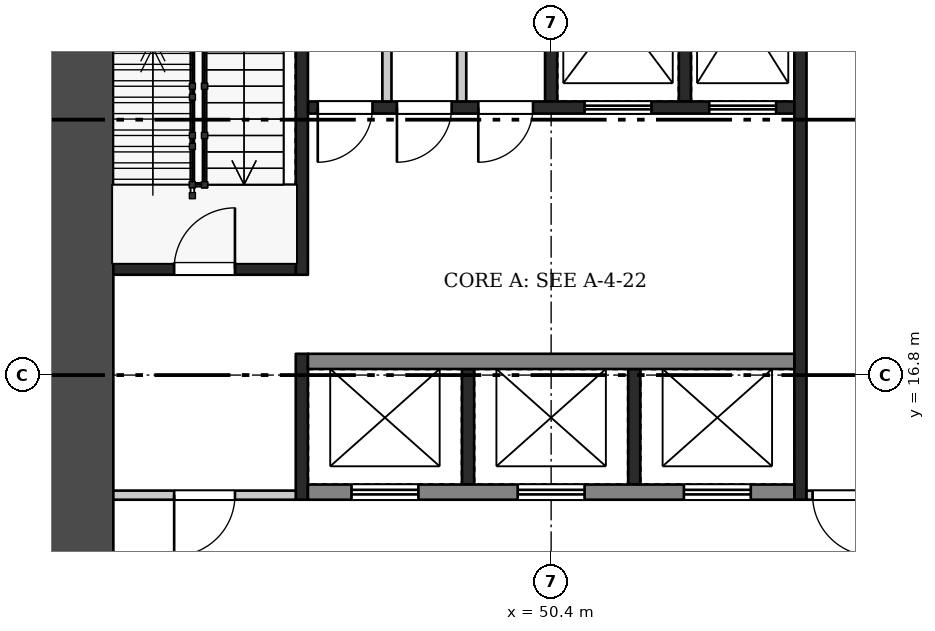
"""IFC4 building model, lengths in metres.
Left out: names, types, materials, properties, quantities, classifications, styles, units other than length and angle.
Written with IfcOpenShell. Run it as: python <this file> out.ifc"""

import sys

from ifc_helpers import new_model, si_unit, direction, frame, frame_2d, origin, place, context, subcontext, project, spatial, rectangle, extrude, element, fill, save


model = new_model("IFC4")
c1 = context("Model", 3, precision=1e-05, world=origin(), true_north=direction((0.0, 1.0)))
c2 = subcontext(c1, "Body", "Model", "MODEL_VIEW")
j1 = project(units=[si_unit("LENGTHUNIT", "METRE"), si_unit("PLANEANGLEUNIT", "RADIAN")], contexts=[c1])
p1 = place(None, origin())
s1 = spatial("IfcSite", under=j1, at=p1, CompositionType="ELEMENT")
p2 = place(p1, origin())
s2 = spatial("IfcBuilding", under=s1, at=p2, CompositionType="ELEMENT")
p3 = place(p2, frame((0.0, 0.0, 140.7)))
s3 = spatial("IfcBuildingStorey", under=s2, at=p3, CompositionType="ELEMENT", Elevation=140.7)
p4 = place(p3, frame((42.6, 9.6, 0.0), z_axis=(0.0, 0.0, 1.0), x_axis=(0.0, 1.0, 0.0)))
e1 = element("IfcWall", 1, at=p4, inside=s3, PredefinedType="SHEAR", context=c2, shape_type="SweptSolid", body=[
    extrude(rectangle(XDim=14.4, YDim=1.2, at=frame_2d((7.2, 0.0))), origin(), (0.0, 0.0, 1.0), 6.72),
])
p5 = place(p4, frame((2.1, 0.0, 0.0)))
e2 = element("IfcOpeningElement", 2, at=p5, cuts=e1, PredefinedType="OPENING", context=c2, shape_type="SweptSolid", body=[
    extrude(rectangle(XDim=1.8, YDim=2.1, at=frame_2d((0.9, 1.05))), frame((0.0, 0.61, 0.0), z_axis=(0.0, -1.0, 0.0), x_axis=(1.0, 0.0, 0.0)), (0.0, 0.0, 1.0), 1.22),
])
for number, where, z_axis, x_axis in (
    (3, (49.033, 15.0, 0.0), (0.0, 0.0, 1.0), (0.0, 1.0, 0.0)),
    (4, (51.767, 15.0, 0.0), (0.0, 0.0, 1.0), (0.0, 1.0, 0.0)),
):
    element("IfcWall", number, at=place(p3, frame(where, z_axis=z_axis, x_axis=x_axis)), inside=s3, PredefinedType="SHEAR", context=c2, shape_type="SweptSolid", body=[
        extrude(rectangle(XDim=1.9, YDim=0.2, at=frame_2d((0.95, 0.0))), origin(), (0.0, 0.0, 1.0), 6.72),
    ])
p6 = place(p3, frame((46.4, 14.875, 0.0), z_axis=(0.0, 0.0, 1.0), x_axis=(1.0, 0.0, 0.0)))
e5 = element("IfcWall", 5, at=p6, inside=s3, PredefinedType="SHEAR", context=c2, shape_type="SweptSolid", body=[
    extrude(rectangle(XDim=8.0, YDim=0.25, at=frame_2d((4.0, 0.0))), origin(), (0.0, 0.0, 1.0), 6.72),
])
p7 = place(p6, frame((0.717, 0.0, 0.0)))
e6 = element("IfcOpeningElement", 6, at=p7, cuts=e5, PredefinedType="OPENING", context=c2, shape_type="SweptSolid", body=[
    extrude(rectangle(XDim=1.1, YDim=2.1, at=frame_2d((0.55, 1.05))), frame((0.0, 0.135, 0.0), z_axis=(0.0, -1.0, 0.0), x_axis=(1.0, 0.0, 0.0)), (0.0, 0.0, 1.0), 0.27),
])
p8 = place(p6, frame((3.45, 0.0, 0.0)))
e7 = element("IfcOpeningElement", 7, at=p8, cuts=e5, PredefinedType="OPENING", context=c2, shape_type="SweptSolid", body=[
    extrude(rectangle(XDim=1.1, YDim=2.1, at=frame_2d((0.55, 1.05))), frame((0.0, 0.135, 0.0), z_axis=(0.0, -1.0, 0.0), x_axis=(1.0, 0.0, 0.0)), (0.0, 0.0, 1.0), 0.27),
])
p9 = place(p6, frame((6.183, 0.0, 0.0)))
e8 = element("IfcOpeningElement", 8, at=p9, cuts=e5, PredefinedType="OPENING", context=c2, shape_type="SweptSolid", body=[
    extrude(rectangle(XDim=1.1, YDim=2.1, at=frame_2d((0.55, 1.05))), frame((0.0, 0.135, 0.0), z_axis=(0.0, -1.0, 0.0), x_axis=(1.0, 0.0, 0.0)), (0.0, 0.0, 1.0), 0.27),
])
p10 = place(p3, frame((46.4, 17.025, 0.0), z_axis=(0.0, 0.0, 1.0), x_axis=(1.0, 0.0, 0.0)))
e9 = element("IfcWall", 9, at=p10, inside=s3, PredefinedType="SHEAR", context=c2, shape_type="SweptSolid", body=[
    extrude(rectangle(XDim=8.0, YDim=0.25, at=frame_2d((4.0, 0.0))), origin(), (0.0, 0.0, 1.0), 6.72),
])
for number, where, z_axis, x_axis in (
    (10, (50.4, 21.3, 0.0), (0.0, 0.0, 1.0), (0.0, 1.0, 0.0)),
    (11, (52.6, 21.3, 0.0), (0.0, 0.0, 1.0), (0.0, 1.0, 0.0)),
):
    element("IfcWall", number, at=place(p3, frame(where, z_axis=z_axis, x_axis=x_axis)), inside=s3, PredefinedType="SHEAR", context=c2, shape_type="SweptSolid", body=[
        extrude(rectangle(XDim=2.7, YDim=0.2, at=frame_2d((1.35, 0.0))), origin(), (0.0, 0.0, 1.0), 6.72),
    ])
for number, where, z_axis, x_axis in (
    (12, (47.699, 21.3, 0.0), (0.0, 0.0, 1.0), (0.0, 1.0, 0.0)),
    (13, (48.929, 21.3, 0.0), (0.0, 0.0, 1.0), (0.0, 1.0, 0.0)),
):
    element("IfcWall", number, at=place(p3, frame(where, z_axis=z_axis, x_axis=x_axis)), inside=s3, PredefinedType="PARTITIONING", context=c2, shape_type="SweptSolid", body=[
        extrude(rectangle(XDim=2.7, YDim=0.15, at=frame_2d((1.35, 0.0))), origin(), (0.0, 0.0, 1.0), 6.72),
    ])
p11 = place(p3, frame((46.4, 21.2, 0.0), z_axis=(0.0, 0.0, 1.0), x_axis=(1.0, 0.0, 0.0)))
e14 = element("IfcWall", 14, at=p11, inside=s3, PredefinedType="SHEAR", context=c2, shape_type="SweptSolid", body=[
    extrude(rectangle(XDim=8.0, YDim=0.2, at=frame_2d((4.0, 0.0))), origin(), (0.0, 0.0, 1.0), 6.72),
])
p12 = place(p11, frame((0.162, 0.0, 0.0)))
e15 = element("IfcOpeningElement", 15, at=p12, cuts=e14, PredefinedType="OPENING", context=c2, shape_type="SweptSolid", body=[
    extrude(rectangle(XDim=0.9, YDim=2.1, at=frame_2d((0.45, 1.05))), frame((0.0, 0.11, 0.0), z_axis=(0.0, -1.0, 0.0), x_axis=(1.0, 0.0, 0.0)), (0.0, 0.0, 1.0), 0.22),
])
p13 = place(p11, frame((1.464, 0.0, 0.0)))
e16 = element("IfcOpeningElement", 16, at=p13, cuts=e14, PredefinedType="OPENING", context=c2, shape_type="SweptSolid", body=[
    extrude(rectangle(XDim=0.9, YDim=2.1, at=frame_2d((0.45, 1.05))), frame((0.0, 0.11, 0.0), z_axis=(0.0, -1.0, 0.0), x_axis=(1.0, 0.0, 0.0)), (0.0, 0.0, 1.0), 0.22),
])
p14 = place(p11, frame((2.802, 0.0, 0.0)))
e17 = element("IfcOpeningElement", 17, at=p14, cuts=e14, PredefinedType="OPENING", context=c2, shape_type="SweptSolid", body=[
    extrude(rectangle(XDim=0.9, YDim=2.1, at=frame_2d((0.45, 1.05))), frame((0.0, 0.11, 0.0), z_axis=(0.0, -1.0, 0.0), x_axis=(1.0, 0.0, 0.0)), (0.0, 0.0, 1.0), 0.22),
])
p15 = place(p11, frame((4.55, 0.0, 0.0)))
e18 = element("IfcOpeningElement", 18, at=p15, cuts=e14, PredefinedType="OPENING", context=c2, shape_type="SweptSolid", body=[
    extrude(rectangle(XDim=1.1, YDim=2.1, at=frame_2d((0.55, 1.05))), frame((0.0, 0.11, 0.0), z_axis=(0.0, -1.0, 0.0), x_axis=(1.0, 0.0, 0.0)), (0.0, 0.0, 1.0), 0.22),
])
p16 = place(p11, frame((6.6, 0.0, 0.0)))
e19 = element("IfcOpeningElement", 19, at=p16, cuts=e14, PredefinedType="OPENING", context=c2, shape_type="SweptSolid", body=[
    extrude(rectangle(XDim=1.1, YDim=2.1, at=frame_2d((0.55, 1.05))), frame((0.0, 0.11, 0.0), z_axis=(0.0, -1.0, 0.0), x_axis=(1.0, 0.0, 0.0)), (0.0, 0.0, 1.0), 0.22),
])
p17 = place(p3, frame((46.3, 14.75, 0.0), z_axis=(0.0, 0.0, 1.0), x_axis=(0.0, 1.0, 0.0)))
e20 = element("IfcWall", 20, at=p17, inside=s3, PredefinedType="SHEAR", context=c2, shape_type="SweptSolid", body=[
    extrude(rectangle(XDim=2.4, YDim=0.2, at=frame_2d((1.2, 0.0))), origin(), (0.0, 0.0, 1.0), 6.72),
])
p18 = place(p3, frame((46.3, 18.45, 0.0), z_axis=(0.0, 0.0, 1.0), x_axis=(0.0, 1.0, 0.0)))
e21 = element("IfcWall", 21, at=p18, inside=s3, PredefinedType="SHEAR", context=c2, shape_type="SweptSolid", body=[
    extrude(rectangle(XDim=5.55, YDim=0.2, at=frame_2d((2.775, 0.0))), origin(), (0.0, 0.0, 1.0), 6.72),
])
p19 = place(p3, frame((43.2, 14.825, 0.0), z_axis=(0.0, 0.0, 1.0), x_axis=(1.0, 0.0, 0.0)))
e22 = element("IfcWall", 22, at=p19, inside=s3, PredefinedType="PARTITIONING", context=c2, shape_type="SweptSolid", body=[
    extrude(rectangle(XDim=3.0, YDim=0.15, at=frame_2d((1.5, 0.0))), origin(), (0.0, 0.0, 1.0), 6.72),
])
p20 = place(p19, frame((1.0, 0.0, 0.0)))
e23 = element("IfcOpeningElement", 23, at=p20, cuts=e22, PredefinedType="OPENING", context=c2, shape_type="SweptSolid", body=[
    extrude(rectangle(XDim=1.0, YDim=2.1, at=frame_2d((0.5, 1.05))), frame((0.0, 0.085, 0.0), z_axis=(0.0, -1.0, 0.0), x_axis=(1.0, 0.0, 0.0)), (0.0, 0.0, 1.0), 0.17),
])
p21 = place(p3, frame((43.2, 18.55, 0.0), z_axis=(0.0, 0.0, 1.0), x_axis=(1.0, 0.0, 0.0)))
e24 = element("IfcWall", 24, at=p21, inside=s3, PredefinedType="SHEAR", context=c2, shape_type="SweptSolid", body=[
    extrude(rectangle(XDim=3.0, YDim=0.2, at=frame_2d((1.5, 0.0))), origin(), (0.0, 0.0, 1.0), 6.72),
])
p22 = place(p21, frame((1.0, 0.0, 0.0)))
e25 = element("IfcOpeningElement", 25, at=p22, cuts=e24, PredefinedType="OPENING", context=c2, shape_type="SweptSolid", body=[
    extrude(rectangle(XDim=1.0, YDim=2.1, at=frame_2d((0.5, 1.05))), frame((0.0, 0.11, 0.0), z_axis=(0.0, -1.0, 0.0), x_axis=(1.0, 0.0, 0.0)), (0.0, 0.0, 1.0), 0.22),
])
p23 = place(p3, frame((54.5, 14.75, 0.0), z_axis=(0.0, 0.0, 1.0), x_axis=(0.0, 1.0, 0.0)))
e26 = element("IfcWall", 26, at=p23, inside=s3, PredefinedType="SHEAR", context=c2, shape_type="SweptSolid", body=[
    extrude(rectangle(XDim=9.25, YDim=0.2, at=frame_2d((4.625, 0.0))), origin(), (0.0, 0.0, 1.0), 6.72),
])
p24 = place(p3, frame((54.6, 14.825, 0.0), z_axis=(0.0, 0.0, 1.0), x_axis=(1.0, 0.0, 0.0)))
e27 = element("IfcWall", 27, at=p24, inside=s3, PredefinedType="PARTITIONING", context=c2, shape_type="SweptSolid", body=[
    extrude(rectangle(XDim=3.0, YDim=0.15, at=frame_2d((1.5, 0.0))), origin(), (0.0, 0.0, 1.0), 6.72),
])
p25 = place(p24, frame((0.1, 0.0, 0.0)))
e28 = element("IfcOpeningElement", 28, at=p25, cuts=e27, PredefinedType="OPENING", context=c2, shape_type="SweptSolid", body=[
    extrude(rectangle(XDim=1.0, YDim=2.1, at=frame_2d((0.5, 1.05))), frame((0.0, 0.085, 0.0), z_axis=(0.0, -1.0, 0.0), x_axis=(1.0, 0.0, 0.0)), (0.0, 0.0, 1.0), 0.17),
])
p26 = place(p7, origin())
e29 = element("IfcDoor", 29, at=p26, inside=s3, OperationType="DOUBLE_DOOR_SLIDING", PredefinedType="DOOR", context=c2, shape_type="SweptSolid", body=[
    extrude(rectangle(XDim=1.1, YDim=2.1, at=frame_2d((0.55, 1.05))), frame((0.0, 0.025, 0.0), z_axis=(0.0, -1.0, 0.0), x_axis=(1.0, 0.0, 0.0)), (0.0, 0.0, 1.0), 0.05),
])
fill(e6, e29)
p27 = place(p8, origin())
e30 = element("IfcDoor", 30, at=p27, inside=s3, OperationType="DOUBLE_DOOR_SLIDING", PredefinedType="DOOR", context=c2, shape_type="SweptSolid", body=[
    extrude(rectangle(XDim=1.1, YDim=2.1, at=frame_2d((0.55, 1.05))), frame((0.0, 0.025, 0.0), z_axis=(0.0, -1.0, 0.0), x_axis=(1.0, 0.0, 0.0)), (0.0, 0.0, 1.0), 0.05),
])
fill(e7, e30)
p28 = place(p9, origin())
e31 = element("IfcDoor", 31, at=p28, inside=s3, OperationType="DOUBLE_DOOR_SLIDING", PredefinedType="DOOR", context=c2, shape_type="SweptSolid", body=[
    extrude(rectangle(XDim=1.1, YDim=2.1, at=frame_2d((0.55, 1.05))), frame((0.0, 0.025, 0.0), z_axis=(0.0, -1.0, 0.0), x_axis=(1.0, 0.0, 0.0)), (0.0, 0.0, 1.0), 0.05),
])
fill(e8, e31)
p29 = place(p12, frame((0.9, 0.0, 0.0), z_axis=(0.0, 0.0, 1.0), x_axis=(-1.0, 0.0, 0.0)))
e32 = element("IfcDoor", 32, at=p29, inside=s3, OperationType="SINGLE_SWING_RIGHT", PredefinedType="DOOR", context=c2, shape_type="SweptSolid", body=[
    extrude(rectangle(XDim=0.9, YDim=2.1, at=frame_2d((0.45, 1.05))), frame((0.0, 0.025, 0.0), z_axis=(0.0, -1.0, 0.0), x_axis=(1.0, 0.0, 0.0)), (0.0, 0.0, 1.0), 0.05),
])
fill(e15, e32)
p30 = place(p13, frame((0.9, 0.0, 0.0), z_axis=(0.0, 0.0, 1.0), x_axis=(-1.0, 0.0, 0.0)))
e33 = element("IfcDoor", 33, at=p30, inside=s3, OperationType="SINGLE_SWING_RIGHT", PredefinedType="DOOR", context=c2, shape_type="SweptSolid", body=[
    extrude(rectangle(XDim=0.9, YDim=2.1, at=frame_2d((0.45, 1.05))), frame((0.0, 0.025, 0.0), z_axis=(0.0, -1.0, 0.0), x_axis=(1.0, 0.0, 0.0)), (0.0, 0.0, 1.0), 0.05),
])
fill(e16, e33)
p31 = place(p14, frame((0.9, 0.0, 0.0), z_axis=(0.0, 0.0, 1.0), x_axis=(-1.0, 0.0, 0.0)))
e34 = element("IfcDoor", 34, at=p31, inside=s3, OperationType="SINGLE_SWING_RIGHT", PredefinedType="DOOR", context=c2, shape_type="SweptSolid", body=[
    extrude(rectangle(XDim=0.9, YDim=2.1, at=frame_2d((0.45, 1.05))), frame((0.0, 0.025, 0.0), z_axis=(0.0, -1.0, 0.0), x_axis=(1.0, 0.0, 0.0)), (0.0, 0.0, 1.0), 0.05),
])
fill(e17, e34)
p32 = place(p15, origin())
e35 = element("IfcDoor", 35, at=p32, inside=s3, OperationType="DOUBLE_DOOR_SLIDING", PredefinedType="DOOR", context=c2, shape_type="SweptSolid", body=[
    extrude(rectangle(XDim=1.1, YDim=2.1, at=frame_2d((0.55, 1.05))), frame((0.0, 0.025, 0.0), z_axis=(0.0, -1.0, 0.0), x_axis=(1.0, 0.0, 0.0)), (0.0, 0.0, 1.0), 0.05),
])
fill(e18, e35)
p33 = place(p16, origin())
e36 = element("IfcDoor", 36, at=p33, inside=s3, OperationType="DOUBLE_DOOR_SLIDING", PredefinedType="DOOR", context=c2, shape_type="SweptSolid", body=[
    extrude(rectangle(XDim=1.1, YDim=2.1, at=frame_2d((0.55, 1.05))), frame((0.0, 0.025, 0.0), z_axis=(0.0, -1.0, 0.0), x_axis=(1.0, 0.0, 0.0)), (0.0, 0.0, 1.0), 0.05),
])
fill(e19, e36)
p34 = place(p20, frame((1.0, 0.0, 0.0), z_axis=(0.0, 0.0, 1.0), x_axis=(-1.0, 0.0, 0.0)))
e37 = element("IfcDoor", 37, at=p34, inside=s3, OperationType="SINGLE_SWING_RIGHT", PredefinedType="DOOR", context=c2, shape_type="SweptSolid", body=[
    extrude(rectangle(XDim=1.0, YDim=2.1, at=frame_2d((0.5, 1.05))), frame((0.0, 0.025, 0.0), z_axis=(0.0, -1.0, 0.0), x_axis=(1.0, 0.0, 0.0)), (0.0, 0.0, 1.0), 0.05),
])
fill(e23, e37)
p35 = place(p22, origin())
e38 = element("IfcDoor", 38, at=p35, inside=s3, OperationType="SINGLE_SWING_RIGHT", PredefinedType="DOOR", context=c2, shape_type="SweptSolid", body=[
    extrude(rectangle(XDim=1.0, YDim=2.1, at=frame_2d((0.5, 1.05))), frame((0.0, 0.025, 0.0), z_axis=(0.0, -1.0, 0.0), x_axis=(1.0, 0.0, 0.0)), (0.0, 0.0, 1.0), 0.05),
])
fill(e25, e38)
p36 = place(p25, frame((1.0, 0.0, 0.0), z_axis=(0.0, 0.0, 1.0), x_axis=(-1.0, 0.0, 0.0)))
e39 = element("IfcDoor", 39, at=p36, inside=s3, OperationType="SINGLE_SWING_LEFT", PredefinedType="DOOR", context=c2, shape_type="SweptSolid", body=[
    extrude(rectangle(XDim=1.0, YDim=2.1, at=frame_2d((0.5, 1.05))), frame((0.0, 0.025, 0.0), z_axis=(0.0, -1.0, 0.0), x_axis=(1.0, 0.0, 0.0)), (0.0, 0.0, 1.0), 0.05),
])
fill(e28, e39)
save(model, sys.argv[1])
